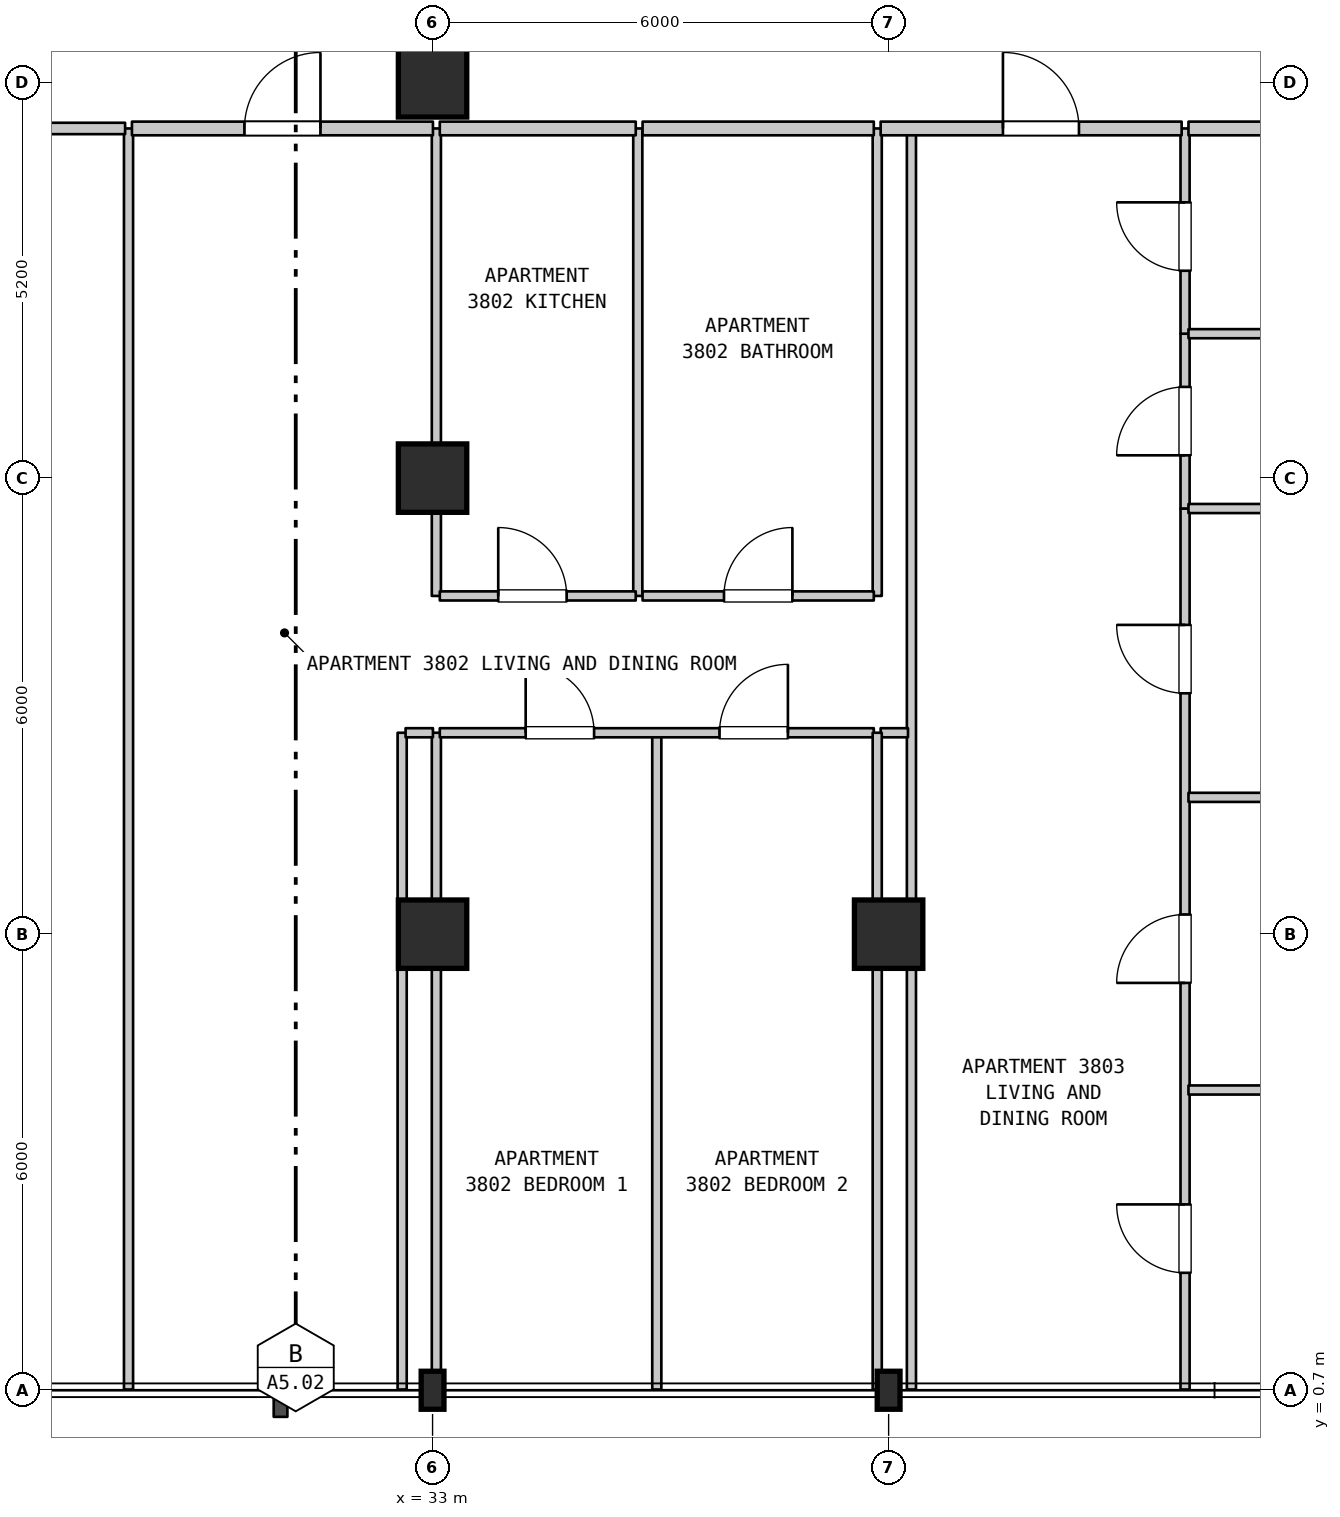
"""IFC4 building model, lengths in metres.
Left out: names, types, materials, properties, quantities, classifications, styles, units other than length and angle.
Written with IfcOpenShell. Run it as: python <this file> out.ifc"""

import sys

from ifc_helpers import new_model, si_unit, direction, frame, frame_2d, origin, origin_2d, place, context, subcontext, project, spatial, rectangle, i_section, extrude, element, fill, save


model = new_model("IFC4")
c1 = context("Model", 3, precision=1e-05, world=origin(), true_north=direction((0.0, 1.0)))
c2 = subcontext(c1, "Body", "Model", "MODEL_VIEW")
j1 = project(units=[si_unit("LENGTHUNIT", "METRE"), si_unit("PLANEANGLEUNIT", "RADIAN")], contexts=[c1])
p1 = place(None, origin())
s1 = spatial("IfcSite", under=j1, at=p1, CompositionType="ELEMENT")
p2 = place(p1, origin())
s2 = spatial("IfcBuilding", under=s1, at=p2, CompositionType="ELEMENT")
p3 = place(p2, frame((0.0, 0.0, 155.7)))
s3 = spatial("IfcBuildingStorey", under=s2, at=p3, CompositionType="ELEMENT", Elevation=155.7)
p4 = place(p3, frame((33.0, 0.7, 0.0), z_axis=(0.0, 0.0, 1.0), x_axis=(1.0, 0.0, 0.0)))
e1 = element("IfcColumn", 1, at=p4, inside=s3, PredefinedType="COLUMN", context=c2, shape_type="SweptSolid", body=[
    extrude(i_section(OverallWidth=0.3, OverallDepth=0.5, WebThickness=0.014, FlangeThickness=0.028, FilletRadius=0.027, at=origin_2d()), origin(), (0.0, 0.0, 1.0), 3.7),
])
for number, where, z_axis, x_axis in (
    (2, (33.0, 6.7, 0.0), (0.0, 0.0, 1.0), (1.0, 0.0, 0.0)),
    (3, (33.0, 12.7, 0.0), (0.0, 0.0, 1.0), (1.0, 0.0, 0.0)),
    (4, (33.0, 17.9, 0.0), (0.0, 0.0, 1.0), (1.0, 0.0, 0.0)),
):
    element("IfcColumn", number, at=place(p3, frame(where, z_axis=z_axis, x_axis=x_axis)), inside=s3, PredefinedType="COLUMN", context=c2, shape_type="SweptSolid", body=[
        extrude(rectangle(XDim=0.9, YDim=0.9, at=origin_2d()), origin(), (0.0, 0.0, 1.0), 3.7),
    ])
p5 = place(p3, frame((39.0, 0.7, 0.0), z_axis=(0.0, 0.0, 1.0), x_axis=(1.0, 0.0, 0.0)))
e5 = element("IfcColumn", 5, at=p5, inside=s3, PredefinedType="COLUMN", context=c2, shape_type="SweptSolid", body=[
    extrude(i_section(OverallWidth=0.3, OverallDepth=0.5, WebThickness=0.014, FlangeThickness=0.028, FilletRadius=0.027, at=origin_2d()), origin(), (0.0, 0.0, 1.0), 3.7),
])
p6 = place(p3, frame((39.0, 6.7, 0.0), z_axis=(0.0, 0.0, 1.0), x_axis=(1.0, 0.0, 0.0)))
e6 = element("IfcColumn", 6, at=p6, inside=s3, PredefinedType="COLUMN", context=c2, shape_type="SweptSolid", body=[
    extrude(rectangle(XDim=0.9, YDim=0.9, at=origin_2d()), origin(), (0.0, 0.0, 1.0), 3.7),
])
p7 = place(p3, frame((29.0, 0.71, 0.0), z_axis=(0.0, 0.0, 1.0), x_axis=(0.0, 1.0, 0.0)))
e7 = element("IfcWall", 7, at=p7, inside=s3, PredefinedType="PARTITIONING", context=c2, shape_type="SweptSolid", body=[
    extrude(rectangle(XDim=16.59, YDim=0.12, at=frame_2d((8.295, 0.0))), origin(), (0.0, 0.0, 1.0), 3.28),
])
p8 = place(p3, frame((32.6, 0.71, 0.0), z_axis=(0.0, 0.0, 1.0), x_axis=(0.0, 1.0, 0.0)))
e8 = element("IfcWall", 8, at=p8, inside=s3, PredefinedType="PARTITIONING", context=c2, shape_type="SweptSolid", body=[
    extrude(rectangle(XDim=8.64, YDim=0.12, at=frame_2d((4.32, 0.0))), origin(), (0.0, 0.0, 1.0), 3.28),
])
p9 = place(p3, frame((33.05, 0.71, 0.0), z_axis=(0.0, 0.0, 1.0), x_axis=(0.0, 1.0, 0.0)))
e9 = element("IfcWall", 9, at=p9, inside=s3, PredefinedType="PARTITIONING", context=c2, shape_type="SweptSolid", body=[
    extrude(rectangle(XDim=8.64, YDim=0.12, at=frame_2d((4.32, 0.0))), origin(), (0.0, 0.0, 1.0), 2.78),
])
p10 = place(p3, frame((33.05, 11.15, 0.0), z_axis=(0.0, 0.0, 1.0), x_axis=(0.0, 1.0, 0.0)))
e10 = element("IfcWall", 10, at=p10, inside=s3, PredefinedType="PARTITIONING", context=c2, shape_type="SweptSolid", body=[
    extrude(rectangle(XDim=6.15, YDim=0.12, at=frame_2d((3.075, 0.0))), origin(), (0.0, 0.0, 1.0), 2.78),
])
p11 = place(p3, frame((35.7, 11.15, 0.0), z_axis=(0.0, 0.0, 1.0), x_axis=(0.0, 1.0, 0.0)))
e11 = element("IfcWall", 11, at=p11, inside=s3, PredefinedType="PARTITIONING", context=c2, shape_type="SweptSolid", body=[
    extrude(rectangle(XDim=6.15, YDim=0.12, at=frame_2d((3.075, 0.0))), origin(), (0.0, 0.0, 1.0), 3.28),
])
p12 = place(p3, frame((35.95, 0.71, 0.0), z_axis=(0.0, 0.0, 1.0), x_axis=(0.0, 1.0, 0.0)))
e12 = element("IfcWall", 12, at=p12, inside=s3, PredefinedType="PARTITIONING", context=c2, shape_type="SweptSolid", body=[
    extrude(rectangle(XDim=8.64, YDim=0.12, at=frame_2d((4.32, 0.0))), origin(), (0.0, 0.0, 1.0), 3.28),
])
p13 = place(p3, frame((38.85, 0.71, 0.0), z_axis=(0.0, 0.0, 1.0), x_axis=(0.0, 1.0, 0.0)))
e13 = element("IfcWall", 13, at=p13, inside=s3, PredefinedType="PARTITIONING", context=c2, shape_type="SweptSolid", body=[
    extrude(rectangle(XDim=5.99, YDim=0.12, at=frame_2d((2.995, 0.0))), origin(), (0.0, 0.0, 1.0), 2.78),
])
p14 = place(p3, frame((38.85, 11.15, 0.0), z_axis=(0.0, 0.0, 1.0), x_axis=(0.0, 1.0, 0.0)))
e14 = element("IfcWall", 14, at=p14, inside=s3, PredefinedType="PARTITIONING", context=c2, shape_type="SweptSolid", body=[
    extrude(rectangle(XDim=6.15, YDim=0.12, at=frame_2d((3.075, 0.0))), origin(), (0.0, 0.0, 1.0), 3.28),
])
p15 = place(p3, frame((39.3, 0.71, 0.0), z_axis=(0.0, 0.0, 1.0), x_axis=(0.0, 1.0, 0.0)))
e15 = element("IfcWall", 15, at=p15, inside=s3, PredefinedType="PARTITIONING", context=c2, shape_type="SweptSolid", body=[
    extrude(rectangle(XDim=16.59, YDim=0.12, at=frame_2d((8.295, 0.0))), origin(), (0.0, 0.0, 1.0), 3.28),
])
p16 = place(p3, frame((42.9, 0.71, 0.0), z_axis=(0.0, 0.0, 1.0), x_axis=(0.0, 1.0, 0.0)))
e16 = element("IfcWall", 16, at=p16, inside=s3, PredefinedType="PARTITIONING", context=c2, shape_type="SweptSolid", body=[
    extrude(rectangle(XDim=11.59, YDim=0.12, at=frame_2d((5.795, 0.0))), origin(), (0.0, 0.0, 1.0), 3.28),
])
p17 = place(p16, frame((1.535, 0.0, 0.0)))
e17 = element("IfcOpeningElement", 17, at=p17, cuts=e16, PredefinedType="OPENING", context=c2, shape_type="SweptSolid", body=[
    extrude(rectangle(XDim=0.9, YDim=2.15, at=frame_2d((0.45, 1.075))), frame((0.0, 0.07, 0.0), z_axis=(0.0, -1.0, 0.0), x_axis=(1.0, 0.0, 0.0)), (0.0, 0.0, 1.0), 0.14),
])
p18 = place(p16, frame((5.349, 0.0, 0.0)))
e18 = element("IfcOpeningElement", 18, at=p18, cuts=e16, PredefinedType="OPENING", context=c2, shape_type="SweptSolid", body=[
    extrude(rectangle(XDim=0.9, YDim=2.15, at=frame_2d((0.45, 1.075))), frame((0.0, 0.07, 0.0), z_axis=(0.0, -1.0, 0.0), x_axis=(1.0, 0.0, 0.0)), (0.0, 0.0, 1.0), 0.14),
])
p19 = place(p16, frame((9.159, 0.0, 0.0)))
e19 = element("IfcOpeningElement", 19, at=p19, cuts=e16, PredefinedType="OPENING", context=c2, shape_type="SweptSolid", body=[
    extrude(rectangle(XDim=0.9, YDim=2.15, at=frame_2d((0.45, 1.075))), frame((0.0, 0.07, 0.0), z_axis=(0.0, -1.0, 0.0), x_axis=(1.0, 0.0, 0.0)), (0.0, 0.0, 1.0), 0.14),
])
p20 = place(p3, frame((42.9, 12.3, 0.0), z_axis=(0.0, 0.0, 1.0), x_axis=(0.0, 1.0, 0.0)))
e20 = element("IfcWall", 20, at=p20, inside=s3, PredefinedType="PARTITIONING", context=c2, shape_type="SweptSolid", body=[
    extrude(rectangle(XDim=2.3, YDim=0.12, at=frame_2d((1.15, 0.0))), origin(), (0.0, 0.0, 1.0), 3.28),
])
p21 = place(p20, frame((0.7, 0.0, 0.0)))
e21 = element("IfcOpeningElement", 21, at=p21, cuts=e20, PredefinedType="OPENING", context=c2, shape_type="SweptSolid", body=[
    extrude(rectangle(XDim=0.9, YDim=2.15, at=frame_2d((0.45, 1.075))), frame((0.0, 0.07, 0.0), z_axis=(0.0, -1.0, 0.0), x_axis=(1.0, 0.0, 0.0)), (0.0, 0.0, 1.0), 0.14),
])
p22 = place(p3, frame((42.9, 14.6, 0.0), z_axis=(0.0, 0.0, 1.0), x_axis=(0.0, 1.0, 0.0)))
e22 = element("IfcWall", 22, at=p22, inside=s3, PredefinedType="PARTITIONING", context=c2, shape_type="SweptSolid", body=[
    extrude(rectangle(XDim=2.7, YDim=0.12, at=frame_2d((1.35, 0.0))), origin(), (0.0, 0.0, 1.0), 3.28),
])
p23 = place(p22, frame((0.828, 0.0, 0.0)))
e23 = element("IfcOpeningElement", 23, at=p23, cuts=e22, PredefinedType="OPENING", context=c2, shape_type="SweptSolid", body=[
    extrude(rectangle(XDim=0.9, YDim=2.1, at=frame_2d((0.45, 1.05))), frame((0.0, 0.07, 0.0), z_axis=(0.0, -1.0, 0.0), x_axis=(1.0, 0.0, 0.0)), (0.0, 0.0, 1.0), 0.14),
])
for number, where, z_axis, x_axis in (
    (24, (42.945, 4.65, 0.0), (0.0, 0.0, 1.0), (1.0, 0.0, 0.0)),
    (25, (42.945, 8.5, 0.0), (0.0, 0.0, 1.0), (1.0, 0.0, 0.0)),
):
    element("IfcWall", number, at=place(p3, frame(where, z_axis=z_axis, x_axis=x_axis)), inside=s3, PredefinedType="PARTITIONING", context=c2, shape_type="SweptSolid", body=[
        extrude(rectangle(XDim=5.78, YDim=0.12, at=frame_2d((2.89, 0.0))), origin(), (0.0, 0.0, 1.0), 3.28),
    ])
p24 = place(p3, frame((32.645, 9.35, 0.0), z_axis=(0.0, 0.0, 1.0), x_axis=(1.0, 0.0, 0.0)))
e26 = element("IfcWall", 26, at=p24, inside=s3, PredefinedType="PARTITIONING", context=c2, shape_type="SweptSolid", body=[
    extrude(rectangle(XDim=0.36, YDim=0.12, at=frame_2d((0.18, 0.0))), origin(), (0.0, 0.0, 1.0), 3.28),
])
p25 = place(p3, frame((33.095, 9.35, 0.0), z_axis=(0.0, 0.0, 1.0), x_axis=(1.0, 0.0, 0.0)))
e27 = element("IfcWall", 27, at=p25, inside=s3, PredefinedType="PARTITIONING", context=c2, shape_type="SweptSolid", body=[
    extrude(rectangle(XDim=5.71, YDim=0.12, at=frame_2d((2.855, 0.0))), origin(), (0.0, 0.0, 1.0), 3.28),
])
p26 = place(p25, frame((1.13, 0.0, 0.0)))
e28 = element("IfcOpeningElement", 28, at=p26, cuts=e27, PredefinedType="OPENING", context=c2, shape_type="SweptSolid", body=[
    extrude(rectangle(XDim=0.9, YDim=2.15, at=frame_2d((0.45, 1.075))), frame((0.0, 0.07, 0.0), z_axis=(0.0, -1.0, 0.0), x_axis=(1.0, 0.0, 0.0)), (0.0, 0.0, 1.0), 0.14),
])
p27 = place(p25, frame((3.68, 0.0, 0.0)))
e29 = element("IfcOpeningElement", 29, at=p27, cuts=e27, PredefinedType="OPENING", context=c2, shape_type="SweptSolid", body=[
    extrude(rectangle(XDim=0.9, YDim=2.15, at=frame_2d((0.45, 1.075))), frame((0.0, 0.07, 0.0), z_axis=(0.0, -1.0, 0.0), x_axis=(1.0, 0.0, 0.0)), (0.0, 0.0, 1.0), 0.14),
])
p28 = place(p3, frame((38.895, 9.35, 0.0), z_axis=(0.0, 0.0, 1.0), x_axis=(1.0, 0.0, 0.0)))
e30 = element("IfcWall", 30, at=p28, inside=s3, PredefinedType="PARTITIONING", context=c2, shape_type="SweptSolid", body=[
    extrude(rectangle(XDim=0.36, YDim=0.12, at=frame_2d((0.18, 0.0))), origin(), (0.0, 0.0, 1.0), 3.28),
])
p29 = place(p3, frame((33.095, 11.15, 0.0), z_axis=(0.0, 0.0, 1.0), x_axis=(1.0, 0.0, 0.0)))
e31 = element("IfcWall", 31, at=p29, inside=s3, PredefinedType="PARTITIONING", context=c2, shape_type="SweptSolid", body=[
    extrude(rectangle(XDim=2.578, YDim=0.12, at=frame_2d((1.289, 0.0))), origin(), (0.0, 0.0, 1.0), 3.28),
])
p30 = place(p29, frame((0.769, 0.0, 0.0)))
e32 = element("IfcOpeningElement", 32, at=p30, cuts=e31, PredefinedType="OPENING", context=c2, shape_type="SweptSolid", body=[
    extrude(rectangle(XDim=0.9, YDim=2.15, at=frame_2d((0.45, 1.075))), frame((0.0, 0.07, 0.0), z_axis=(0.0, -1.0, 0.0), x_axis=(1.0, 0.0, 0.0)), (0.0, 0.0, 1.0), 0.14),
])
p31 = place(p3, frame((35.763, 11.15, 0.0), z_axis=(0.0, 0.0, 1.0), x_axis=(1.0, 0.0, 0.0)))
e33 = element("IfcWall", 33, at=p31, inside=s3, PredefinedType="PARTITIONING", context=c2, shape_type="SweptSolid", body=[
    extrude(rectangle(XDim=3.042, YDim=0.12, at=frame_2d((1.521, 0.0))), origin(), (0.0, 0.0, 1.0), 3.28),
])
p32 = place(p31, frame((1.071, 0.0, 0.0)))
e34 = element("IfcOpeningElement", 34, at=p32, cuts=e33, PredefinedType="OPENING", context=c2, shape_type="SweptSolid", body=[
    extrude(rectangle(XDim=0.9, YDim=2.1, at=frame_2d((0.45, 1.05))), frame((0.0, 0.07, 0.0), z_axis=(0.0, -1.0, 0.0), x_axis=(1.0, 0.0, 0.0)), (0.0, 0.0, 1.0), 0.14),
])
for number, where, z_axis, x_axis in (
    (35, (42.945, 12.3, 0.0), (0.0, 0.0, 1.0), (1.0, 0.0, 0.0)),
    (36, (42.945, 14.6, 0.0), (0.0, 0.0, 1.0), (1.0, 0.0, 0.0)),
):
    element("IfcWall", number, at=place(p3, frame(where, z_axis=z_axis, x_axis=x_axis)), inside=s3, PredefinedType="PARTITIONING", context=c2, shape_type="SweptSolid", body=[
        extrude(rectangle(XDim=5.78, YDim=0.12, at=frame_2d((2.89, 0.0))), origin(), (0.0, 0.0, 1.0), 3.28),
    ])
p33 = place(p3, frame((24.245, 17.3, 0.0), z_axis=(0.0, 0.0, 1.0), x_axis=(1.0, 0.0, 0.0)))
e37 = element("IfcWall", 37, at=p33, inside=s3, PredefinedType="STANDARD", context=c2, shape_type="SweptSolid", body=[
    extrude(rectangle(XDim=4.71, YDim=0.15, at=frame_2d((2.355, 0.0))), origin(), (0.0, 0.0, 1.0), 3.28),
])
p34 = place(p33, frame((1.782, 0.0, 0.0)))
e38 = element("IfcOpeningElement", 38, at=p34, cuts=e37, PredefinedType="OPENING", context=c2, shape_type="SweptSolid", body=[
    extrude(rectangle(XDim=1.0, YDim=2.15, at=frame_2d((0.5, 1.075))), frame((0.0, 0.085, 0.0), z_axis=(0.0, -1.0, 0.0), x_axis=(1.0, 0.0, 0.0)), (0.0, 0.0, 1.0), 0.17),
])
p35 = place(p3, frame((29.045, 17.3, 0.0), z_axis=(0.0, 0.0, 1.0), x_axis=(1.0, 0.0, 0.0)))
e39 = element("IfcWall", 39, at=p35, inside=s3, PredefinedType="STANDARD", context=c2, shape_type="SweptSolid", body=[
    extrude(rectangle(XDim=3.96, YDim=0.18, at=frame_2d((1.98, 0.0))), origin(), (0.0, 0.0, 1.0), 3.28),
])
p36 = place(p35, frame((1.48, 0.0, 0.0)))
e40 = element("IfcOpeningElement", 40, at=p36, cuts=e39, PredefinedType="OPENING", context=c2, shape_type="SweptSolid", body=[
    extrude(rectangle(XDim=1.0, YDim=2.15, at=frame_2d((0.5, 1.075))), frame((0.0, 0.1, 0.0), z_axis=(0.0, -1.0, 0.0), x_axis=(1.0, 0.0, 0.0)), (0.0, 0.0, 1.0), 0.2),
])
p37 = place(p3, frame((33.095, 17.3, 0.0), z_axis=(0.0, 0.0, 1.0), x_axis=(1.0, 0.0, 0.0)))
e41 = element("IfcWall", 41, at=p37, inside=s3, PredefinedType="STANDARD", context=c2, shape_type="SweptSolid", body=[
    extrude(rectangle(XDim=2.578, YDim=0.18, at=frame_2d((1.289, 0.0))), origin(), (0.0, 0.0, 1.0), 3.28),
])
p38 = place(p3, frame((35.763, 17.3, 0.0), z_axis=(0.0, 0.0, 1.0), x_axis=(1.0, 0.0, 0.0)))
e42 = element("IfcWall", 42, at=p38, inside=s3, PredefinedType="STANDARD", context=c2, shape_type="SweptSolid", body=[
    extrude(rectangle(XDim=3.042, YDim=0.18, at=frame_2d((1.521, 0.0))), origin(), (0.0, 0.0, 1.0), 3.28),
])
p39 = place(p3, frame((38.895, 17.3, 0.0), z_axis=(0.0, 0.0, 1.0), x_axis=(1.0, 0.0, 0.0)))
e43 = element("IfcWall", 43, at=p39, inside=s3, PredefinedType="STANDARD", context=c2, shape_type="SweptSolid", body=[
    extrude(rectangle(XDim=3.96, YDim=0.18, at=frame_2d((1.98, 0.0))), origin(), (0.0, 0.0, 1.0), 3.28),
])
p40 = place(p39, frame((1.609, 0.0, 0.0)))
e44 = element("IfcOpeningElement", 44, at=p40, cuts=e43, PredefinedType="OPENING", context=c2, shape_type="SweptSolid", body=[
    extrude(rectangle(XDim=1.0, YDim=2.15, at=frame_2d((0.5, 1.075))), frame((0.0, 0.1, 0.0), z_axis=(0.0, -1.0, 0.0), x_axis=(1.0, 0.0, 0.0)), (0.0, 0.0, 1.0), 0.2),
])
p41 = place(p3, frame((42.945, 17.3, 0.0), z_axis=(0.0, 0.0, 1.0), x_axis=(1.0, 0.0, 0.0)))
e45 = element("IfcWall", 45, at=p41, inside=s3, PredefinedType="STANDARD", context=c2, shape_type="SweptSolid", body=[
    extrude(rectangle(XDim=5.78, YDim=0.18, at=frame_2d((2.89, 0.0))), origin(), (0.0, 0.0, 1.0), 3.28),
])
p42 = place(p3, frame((38.85, 6.7, 0.0), z_axis=(0.0, 0.0, 1.0), x_axis=(0.0, 1.0, 0.0)))
e46 = element("IfcWall", 46, at=p42, inside=s3, PredefinedType="PARTITIONING", context=c2, shape_type="SweptSolid", body=[
    extrude(rectangle(XDim=2.65, YDim=0.12, at=frame_2d((1.325, 0.0))), origin(), (0.0, 0.0, 1.0), 3.28),
])
p43 = place(p17, origin())
e47 = element("IfcDoor", 47, at=p43, inside=s3, OperationType="SINGLE_SWING_RIGHT", PredefinedType="DOOR", context=c2, shape_type="SweptSolid", body=[
    extrude(rectangle(XDim=0.9, YDim=2.15, at=frame_2d((0.45, 1.075))), frame((0.0, 0.025, 0.0), z_axis=(0.0, -1.0, 0.0), x_axis=(1.0, 0.0, 0.0)), (0.0, 0.0, 1.0), 0.05),
])
fill(e17, e47)
p44 = place(p18, origin())
e48 = element("IfcDoor", 48, at=p44, inside=s3, OperationType="SINGLE_SWING_LEFT", PredefinedType="DOOR", context=c2, shape_type="SweptSolid", body=[
    extrude(rectangle(XDim=0.9, YDim=2.15, at=frame_2d((0.45, 1.075))), frame((0.0, 0.025, 0.0), z_axis=(0.0, -1.0, 0.0), x_axis=(1.0, 0.0, 0.0)), (0.0, 0.0, 1.0), 0.05),
])
fill(e18, e48)
p45 = place(p19, origin())
e49 = element("IfcDoor", 49, at=p45, inside=s3, OperationType="SINGLE_SWING_RIGHT", PredefinedType="DOOR", context=c2, shape_type="SweptSolid", body=[
    extrude(rectangle(XDim=0.9, YDim=2.15, at=frame_2d((0.45, 1.075))), frame((0.0, 0.025, 0.0), z_axis=(0.0, -1.0, 0.0), x_axis=(1.0, 0.0, 0.0)), (0.0, 0.0, 1.0), 0.05),
])
fill(e19, e49)
p46 = place(p21, origin())
e50 = element("IfcDoor", 50, at=p46, inside=s3, OperationType="SINGLE_SWING_LEFT", PredefinedType="DOOR", context=c2, shape_type="SweptSolid", body=[
    extrude(rectangle(XDim=0.9, YDim=2.15, at=frame_2d((0.45, 1.075))), frame((0.0, 0.025, 0.0), z_axis=(0.0, -1.0, 0.0), x_axis=(1.0, 0.0, 0.0)), (0.0, 0.0, 1.0), 0.05),
])
fill(e21, e50)
p47 = place(p23, origin())
e51 = element("IfcDoor", 51, at=p47, inside=s3, OperationType="SINGLE_SWING_RIGHT", PredefinedType="DOOR", context=c2, shape_type="SweptSolid", body=[
    extrude(rectangle(XDim=0.9, YDim=2.1, at=frame_2d((0.45, 1.05))), frame((0.0, 0.025, 0.0), z_axis=(0.0, -1.0, 0.0), x_axis=(1.0, 0.0, 0.0)), (0.0, 0.0, 1.0), 0.05),
])
fill(e23, e51)
p48 = place(p26, origin())
e52 = element("IfcDoor", 52, at=p48, inside=s3, OperationType="SINGLE_SWING_LEFT", PredefinedType="DOOR", context=c2, shape_type="SweptSolid", body=[
    extrude(rectangle(XDim=0.9, YDim=2.15, at=frame_2d((0.45, 1.075))), frame((0.0, 0.025, 0.0), z_axis=(0.0, -1.0, 0.0), x_axis=(1.0, 0.0, 0.0)), (0.0, 0.0, 1.0), 0.05),
])
fill(e28, e52)
p49 = place(p27, origin())
e53 = element("IfcDoor", 53, at=p49, inside=s3, OperationType="SINGLE_SWING_RIGHT", PredefinedType="DOOR", context=c2, shape_type="SweptSolid", body=[
    extrude(rectangle(XDim=0.9, YDim=2.15, at=frame_2d((0.45, 1.075))), frame((0.0, 0.025, 0.0), z_axis=(0.0, -1.0, 0.0), x_axis=(1.0, 0.0, 0.0)), (0.0, 0.0, 1.0), 0.05),
])
fill(e29, e53)
p50 = place(p30, origin())
e54 = element("IfcDoor", 54, at=p50, inside=s3, OperationType="SINGLE_SWING_LEFT", PredefinedType="DOOR", context=c2, shape_type="SweptSolid", body=[
    extrude(rectangle(XDim=0.9, YDim=2.15, at=frame_2d((0.45, 1.075))), frame((0.0, 0.025, 0.0), z_axis=(0.0, -1.0, 0.0), x_axis=(1.0, 0.0, 0.0)), (0.0, 0.0, 1.0), 0.05),
])
fill(e32, e54)
p51 = place(p32, origin())
e55 = element("IfcDoor", 55, at=p51, inside=s3, OperationType="SINGLE_SWING_RIGHT", PredefinedType="DOOR", context=c2, shape_type="SweptSolid", body=[
    extrude(rectangle(XDim=0.9, YDim=2.1, at=frame_2d((0.45, 1.05))), frame((0.0, 0.025, 0.0), z_axis=(0.0, -1.0, 0.0), x_axis=(1.0, 0.0, 0.0)), (0.0, 0.0, 1.0), 0.05),
])
fill(e34, e55)
p52 = place(p36, origin())
e56 = element("IfcDoor", 56, at=p52, inside=s3, OperationType="SINGLE_SWING_RIGHT", PredefinedType="DOOR", context=c2, shape_type="SweptSolid", body=[
    extrude(rectangle(XDim=1.0, YDim=2.15, at=frame_2d((0.5, 1.075))), frame((0.0, 0.025, 0.0), z_axis=(0.0, -1.0, 0.0), x_axis=(1.0, 0.0, 0.0)), (0.0, 0.0, 1.0), 0.05),
])
fill(e40, e56)
p53 = place(p40, origin())
e57 = element("IfcDoor", 57, at=p53, inside=s3, OperationType="SINGLE_SWING_LEFT", PredefinedType="DOOR", context=c2, shape_type="SweptSolid", body=[
    extrude(rectangle(XDim=1.0, YDim=2.15, at=frame_2d((0.5, 1.075))), frame((0.0, 0.025, 0.0), z_axis=(0.0, -1.0, 0.0), x_axis=(1.0, 0.0, 0.0)), (0.0, 0.0, 1.0), 0.05),
])
fill(e44, e57)
save(model, sys.argv[1])
